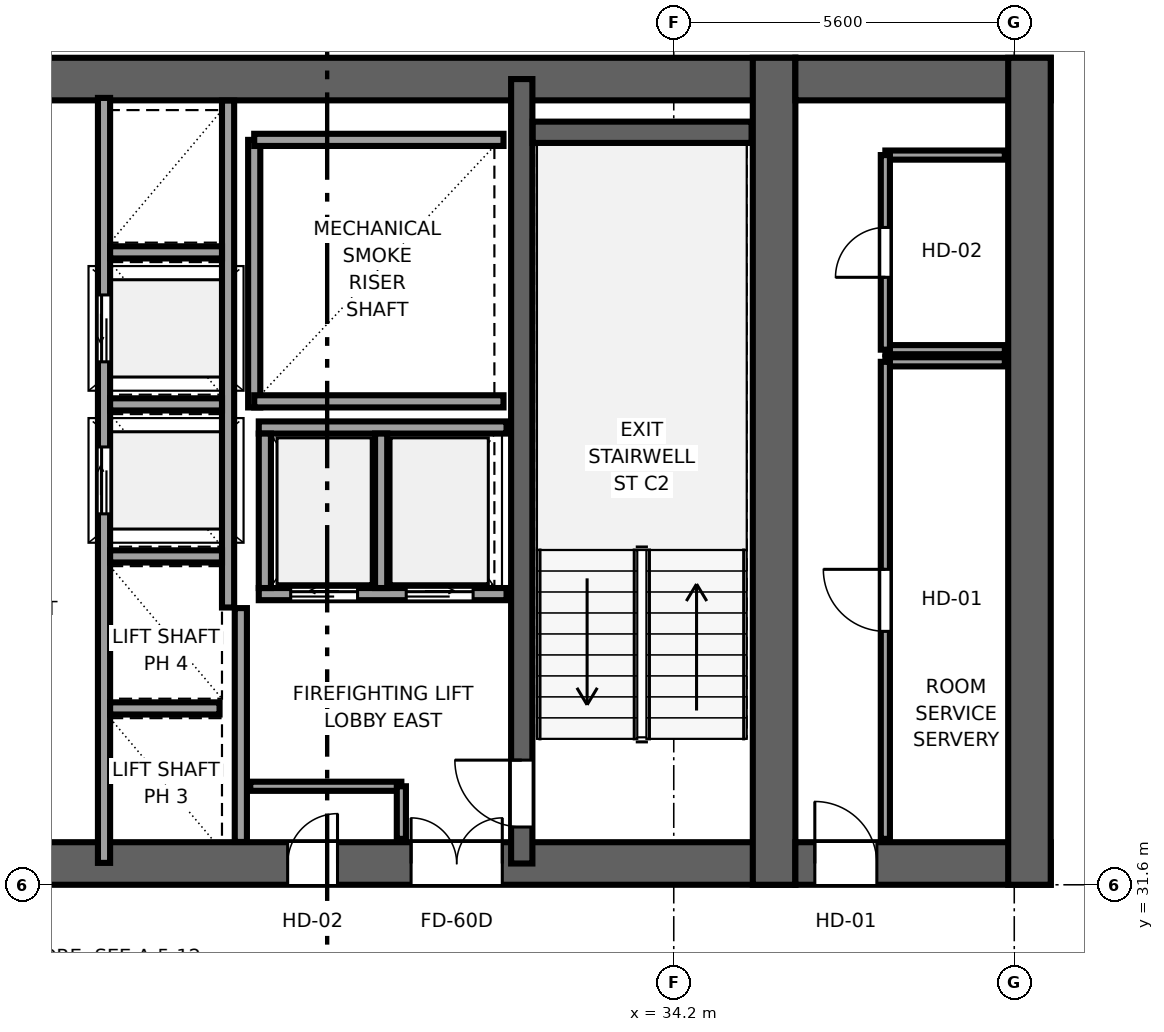
"""IFC4 building model, lengths in metres.
Left out: names, types, materials, properties, quantities, classifications, styles, units other than length and angle.
Written with IfcOpenShell. Run it as: python <this file> out.ifc"""

import sys

from ifc_helpers import new_model, si_unit, direction, frame, frame_2d, origin, place, context, subcontext, project, spatial, rectangle, extrude, source, transform, mapped, element, fill, save


model = new_model("IFC4")
c1 = context("Model", 3, precision=1e-05, world=origin(), true_north=direction((0.0, 1.0)))
c2 = subcontext(c1, "Body", "Model", "MODEL_VIEW")
j1 = project(units=[si_unit("LENGTHUNIT", "METRE"), si_unit("PLANEANGLEUNIT", "RADIAN")], contexts=[c1])
p1 = place(None, origin())
s1 = spatial("IfcSite", under=j1, at=p1, CompositionType="ELEMENT")
p2 = place(p1, origin())
s2 = spatial("IfcBuilding", under=s1, at=p2, CompositionType="ELEMENT")
p3 = place(p2, frame((0.0, 0.0, 179.0)))
s3 = spatial("IfcBuildingStorey", under=s2, at=p3, CompositionType="ELEMENT", Elevation=179.0)
p4 = place(p3, frame((9.8, 31.95, 0.0), z_axis=(0.0, 0.0, 1.0), x_axis=(1.0, 0.0, 0.0)))
e1 = element("IfcWall", 1, at=p4, inside=s3, PredefinedType="SHEAR", context=c2, shape_type="SweptSolid", body=[
    extrude(rectangle(XDim=26.4, YDim=0.7, at=frame_2d((13.2, 0.0))), origin(), (0.0, 0.0, 1.0), 3.55),
])
p5 = place(p4, frame((6.32, 0.0, 0.0), z_axis=(0.0, 0.0, 1.0), x_axis=(-1.0, 0.0, 0.0)))
e2 = element("IfcOpeningElement", 2, at=p5, cuts=e1, PredefinedType="OPENING", context=c2, shape_type="SweptSolid", body=[
    extrude(rectangle(XDim=1.5, YDim=2.04, at=frame_2d((0.75, 1.02))), frame((0.0, 0.36, 0.0), z_axis=(0.0, -1.0, 0.0), x_axis=(1.0, 0.0, 0.0)), (0.0, 0.0, 1.0), 0.72),
])
p6 = place(p4, frame((13.95, 0.0, 0.0), z_axis=(0.0, 0.0, 1.0), x_axis=(-1.0, 0.0, 0.0)))
e3 = element("IfcOpeningElement", 3, at=p6, cuts=e1, PredefinedType="OPENING", context=c2, shape_type="SweptSolid", body=[
    extrude(rectangle(XDim=1.5, YDim=2.04, at=frame_2d((0.75, 1.02))), frame((0.0, 0.36, 0.0), z_axis=(0.0, -1.0, 0.0), x_axis=(1.0, 0.0, 0.0)), (0.0, 0.0, 1.0), 0.72),
])
p7 = place(p4, frame((21.58, 0.0, 0.0), z_axis=(0.0, 0.0, 1.0), x_axis=(-1.0, 0.0, 0.0)))
e4 = element("IfcOpeningElement", 4, at=p7, cuts=e1, PredefinedType="OPENING", context=c2, shape_type="SweptSolid", body=[
    extrude(rectangle(XDim=1.5, YDim=2.04, at=frame_2d((0.75, 1.02))), frame((0.0, 0.36, 0.0), z_axis=(0.0, -1.0, 0.0), x_axis=(1.0, 0.0, 0.0)), (0.0, 0.0, 1.0), 0.72),
])
p8 = place(p4, frame((8.37, 0.0, 0.0), z_axis=(0.0, 0.0, 1.0), x_axis=(-1.0, 0.0, 0.0)))
e5 = element("IfcOpeningElement", 5, at=p8, cuts=e1, PredefinedType="OPENING", context=c2, shape_type="SweptSolid", body=[
    extrude(rectangle(XDim=0.82, YDim=2.01, at=frame_2d((0.41, 1.005))), frame((0.0, 0.36, 0.0), z_axis=(0.0, -1.0, 0.0), x_axis=(1.0, 0.0, 0.0)), (0.0, 0.0, 1.0), 0.72),
])
p9 = place(p4, frame((18.87, 0.0, 0.0), z_axis=(0.0, 0.0, 1.0), x_axis=(-1.0, 0.0, 0.0)))
e6 = element("IfcOpeningElement", 6, at=p9, cuts=e1, PredefinedType="OPENING", context=c2, shape_type="SweptSolid", body=[
    extrude(rectangle(XDim=0.82, YDim=2.01, at=frame_2d((0.41, 1.005))), frame((0.0, 0.36, 0.0), z_axis=(0.0, -1.0, 0.0), x_axis=(1.0, 0.0, 0.0)), (0.0, 0.0, 1.0), 0.72),
])
p10 = place(p3, frame((9.8, 44.85, 0.0), z_axis=(0.0, 0.0, 1.0), x_axis=(1.0, 0.0, 0.0)))
e7 = element("IfcWall", 7, at=p10, inside=s3, PredefinedType="SHEAR", context=c2, shape_type="SweptSolid", body=[
    extrude(rectangle(XDim=26.4, YDim=0.7, at=frame_2d((13.2, 0.0))), origin(), (0.0, 0.0, 1.0), 3.55),
])
p11 = place(p3, frame((35.85, 31.6, 0.0), z_axis=(0.0, 0.0, 1.0), x_axis=(0.0, 1.0, 0.0)))
e8 = element("IfcWall", 8, at=p11, inside=s3, PredefinedType="SHEAR", context=c2, shape_type="SweptSolid", body=[
    extrude(rectangle(XDim=13.6, YDim=0.7, at=frame_2d((6.8, 0.0))), origin(), (0.0, 0.0, 1.0), 3.55),
])
p12 = place(p3, frame((31.7, 31.95, 0.0), z_axis=(0.0, 0.0, 1.0), x_axis=(0.0, 1.0, 0.0)))
e9 = element("IfcWall", 9, at=p12, inside=s3, PredefinedType="SHEAR", context=c2, shape_type="SweptSolid", body=[
    extrude(rectangle(XDim=12.9, YDim=0.35, at=frame_2d((6.45, 0.0))), origin(), (0.0, 0.0, 1.0), 3.55),
])
p13 = place(p12, frame((1.7, 0.0, 0.0), z_axis=(0.0, 0.0, 1.0), x_axis=(-1.0, 0.0, 0.0)))
e10 = element("IfcOpeningElement", 10, at=p13, cuts=e9, PredefinedType="OPENING", context=c2, shape_type="SweptSolid", body=[
    extrude(rectangle(XDim=1.1, YDim=2.12, at=frame_2d((0.55, 1.06))), frame((0.0, 0.185, 0.0), z_axis=(0.0, -1.0, 0.0), x_axis=(1.0, 0.0, 0.0)), (0.0, 0.0, 1.0), 0.37),
])
p14 = place(p3, frame((36.2, 31.95, 0.0), z_axis=(0.0, 0.0, 1.0), x_axis=(1.0, 0.0, 0.0)))
e11 = element("IfcWall", 11, at=p14, inside=s3, PredefinedType="SHEAR", context=c2, shape_type="SweptSolid", body=[
    extrude(rectangle(XDim=4.2, YDim=0.7, at=frame_2d((2.1, 0.0))), origin(), (0.0, 0.0, 1.0), 3.55),
])
p15 = place(p14, frame((1.34, 0.0, 0.0), z_axis=(0.0, 0.0, 1.0), x_axis=(-1.0, 0.0, 0.0)))
e12 = element("IfcOpeningElement", 12, at=p15, cuts=e11, PredefinedType="OPENING", context=c2, shape_type="SweptSolid", body=[
    extrude(rectangle(XDim=1.02, YDim=2.03, at=frame_2d((0.51, 1.015))), frame((0.0, 0.36, 0.0), z_axis=(0.0, -1.0, 0.0), x_axis=(1.0, 0.0, 0.0)), (0.0, 0.0, 1.0), 0.72),
])
p16 = place(p3, frame((36.2, 44.85, 0.0), z_axis=(0.0, 0.0, 1.0), x_axis=(1.0, 0.0, 0.0)))
e13 = element("IfcWall", 13, at=p16, inside=s3, PredefinedType="SHEAR", context=c2, shape_type="SweptSolid", body=[
    extrude(rectangle(XDim=4.2, YDim=0.7, at=frame_2d((2.1, 0.0))), origin(), (0.0, 0.0, 1.0), 3.55),
])
p17 = place(p3, frame((40.05, 31.6, 0.0), z_axis=(0.0, 0.0, 1.0), x_axis=(0.0, 1.0, 0.0)))
e14 = element("IfcWall", 14, at=p17, inside=s3, PredefinedType="SHEAR", context=c2, shape_type="SweptSolid", body=[
    extrude(rectangle(XDim=13.6, YDim=0.7, at=frame_2d((6.8, 0.0))), origin(), (0.0, 0.0, 1.0), 3.55),
])
p18 = place(p3, frame((31.88, 43.975, 0.0), z_axis=(0.0, 0.0, 1.0), x_axis=(1.0, 0.0, 0.0)))
e15 = element("IfcWall", 15, at=p18, inside=s3, PredefinedType="SHEAR", context=c2, shape_type="SweptSolid", body=[
    extrude(rectangle(XDim=3.6, YDim=0.35, at=frame_2d((1.8, 0.0))), origin(), (0.0, 0.0, 1.0), 3.55),
])
p19 = place(p3, frame((27.3, 39.45, 0.0), z_axis=(0.0, 0.0, 1.0), x_axis=(0.0, 1.0, 0.0)))
e16 = element("IfcWall", 16, at=p19, inside=s3, PredefinedType="SOLIDWALL", context=c2, shape_type="SweptSolid", body=[
    extrude(rectangle(XDim=4.4, YDim=0.2, at=frame_2d((2.2, 0.0))), origin(), (0.0, 0.0, 1.0), 3.25),
])
for number, where, z_axis, x_axis in (
    (17, (27.3, 39.55, 0.0), (0.0, 0.0, 1.0), (1.0, 0.0, 0.0)),
    (18, (27.3, 43.85, 0.0), (0.0, 0.0, 1.0), (1.0, 0.0, 0.0)),
):
    element("IfcWall", number, at=place(p3, frame(where, z_axis=z_axis, x_axis=x_axis)), inside=s3, PredefinedType="SOLIDWALL", context=c2, shape_type="SweptSolid", body=[
        extrude(rectangle(XDim=4.1, YDim=0.2, at=frame_2d((2.05, 0.0))), origin(), (0.0, 0.0, 1.0), 3.25),
    ])
p20 = place(p3, frame((27.08, 32.304, 0.0), z_axis=(0.0, 0.0, 1.0), x_axis=(0.0, 1.0, 0.0)))
e19 = element("IfcWall", 19, at=p20, inside=s3, PredefinedType="SOLIDWALL", context=c2, shape_type="SweptSolid", body=[
    extrude(rectangle(XDim=3.846, YDim=0.2, at=frame_2d((1.923, 0.0))), origin(), (0.0, 0.0, 1.0), 3.25),
])
p21 = place(p3, frame((27.375, 36.38, 0.0), z_axis=(0.0, 0.0, 1.0), x_axis=(1.0, 0.0, 0.0)))
e20 = element("IfcWall", 20, at=p21, inside=s3, PredefinedType="SOLIDWALL", context=c2, shape_type="SweptSolid", body=[
    extrude(rectangle(XDim=4.075, YDim=0.2, at=frame_2d((2.038, 0.0))), origin(), (0.0, 0.0, 1.0), 3.25),
])
p22 = place(p21, frame((0.525, 0.0, 0.0)))
e21 = element("IfcOpeningElement", 21, at=p22, cuts=e20, PredefinedType="OPENING", context=c2, shape_type="SweptSolid", body=[
    extrude(rectangle(XDim=1.1, YDim=2.12, at=frame_2d((0.55, 1.06))), frame((0.0, 0.11, 0.0), z_axis=(0.0, -1.0, 0.0), x_axis=(1.0, 0.0, 0.0)), (0.0, 0.0, 1.0), 0.22),
])
p23 = place(p21, frame((2.425, 0.0, 0.0)))
e22 = element("IfcOpeningElement", 22, at=p23, cuts=e20, PredefinedType="OPENING", context=c2, shape_type="SweptSolid", body=[
    extrude(rectangle(XDim=1.1, YDim=2.12, at=frame_2d((0.55, 1.06))), frame((0.0, 0.11, 0.0), z_axis=(0.0, -1.0, 0.0), x_axis=(1.0, 0.0, 0.0)), (0.0, 0.0, 1.0), 0.22),
])
p24 = place(p3, frame((27.375, 39.12, 0.0), z_axis=(0.0, 0.0, 1.0), x_axis=(1.0, 0.0, 0.0)))
e23 = element("IfcWall", 23, at=p24, inside=s3, PredefinedType="SOLIDWALL", context=c2, shape_type="SweptSolid", body=[
    extrude(rectangle(XDim=4.075, YDim=0.2, at=frame_2d((2.038, 0.0))), origin(), (0.0, 0.0, 1.0), 3.25),
])
for number, where, z_axis, x_axis in (
    (24, (27.475, 36.48, 0.0), (0.0, 0.0, 1.0), (0.0, 1.0, 0.0)),
    (25, (29.387, 36.48, 0.0), (0.0, 0.0, 1.0), (0.0, 1.0, 0.0)),
):
    element("IfcWall", number, at=place(p3, frame(where, z_axis=z_axis, x_axis=x_axis)), inside=s3, PredefinedType="SOLIDWALL", context=c2, shape_type="SweptSolid", body=[
        extrude(rectangle(XDim=2.54, YDim=0.2, at=frame_2d((1.27, 0.0))), origin(), (0.0, 0.0, 1.0), 3.25),
    ])
p25 = place(p3, frame((24.83, 31.96, 0.0), z_axis=(0.0, 0.0, 1.0), x_axis=(0.0, 1.0, 0.0)))
e26 = element("IfcWall", 26, at=p25, inside=s3, PredefinedType="SOLIDWALL", context=c2, shape_type="SweptSolid", body=[
    extrude(rectangle(XDim=12.58, YDim=0.2, at=frame_2d((6.29, 0.0))), origin(), (0.0, 0.0, 1.0), 3.25),
])
p26 = place(p25, frame((5.74, 0.0, 0.0)))
e27 = element("IfcOpeningElement", 27, at=p26, cuts=e26, PredefinedType="OPENING", context=c2, shape_type="SweptSolid", body=[
    extrude(rectangle(XDim=1.1, YDim=2.12, at=frame_2d((0.55, 1.06))), frame((0.0, 0.11, 0.0), z_axis=(0.0, -1.0, 0.0), x_axis=(1.0, 0.0, 0.0)), (0.0, 0.0, 1.0), 0.22),
])
p27 = place(p25, frame((8.24, 0.0, 0.0)))
e28 = element("IfcOpeningElement", 28, at=p27, cuts=e26, PredefinedType="OPENING", context=c2, shape_type="SweptSolid", body=[
    extrude(rectangle(XDim=1.1, YDim=2.12, at=frame_2d((0.55, 1.06))), frame((0.0, 0.11, 0.0), z_axis=(0.0, -1.0, 0.0), x_axis=(1.0, 0.0, 0.0)), (0.0, 0.0, 1.0), 0.22),
])
p28 = place(p3, frame((26.87, 36.16, 0.0), z_axis=(0.0, 0.0, 1.0), x_axis=(0.0, 1.0, 0.0)))
e29 = element("IfcWall", 29, at=p28, inside=s3, PredefinedType="SOLIDWALL", context=c2, shape_type="SweptSolid", body=[
    extrude(rectangle(XDim=8.336, YDim=0.2, at=frame_2d((4.168, 0.0))), origin(), (0.0, 0.0, 1.0), 3.25),
])
p29 = place(p3, frame((24.93, 34.5, 0.0), z_axis=(0.0, 0.0, 1.0), x_axis=(1.0, 0.0, 0.0)))
e30 = element("IfcWall", 30, at=p29, inside=s3, PredefinedType="SOLIDWALL", context=c2, shape_type="SweptSolid", body=[
    extrude(rectangle(XDim=1.8, YDim=0.2, at=frame_2d((0.9, 0.0))), origin(), (0.0, 0.0, 1.0), 3.25),
])
for number, where, z_axis, x_axis in (
    (31, (24.93, 37.0, 0.0), (0.0, 0.0, 1.0), (1.0, 0.0, 0.0)),
    (32, (24.93, 39.5, 0.0), (0.0, 0.0, 1.0), (1.0, 0.0, 0.0)),
    (33, (24.93, 42.0, 0.0), (0.0, 0.0, 1.0), (1.0, 0.0, 0.0)),
):
    element("IfcWall", number, at=place(p3, frame(where, z_axis=z_axis, x_axis=x_axis)), inside=s3, PredefinedType="SOLIDWALL", context=c2, shape_type="SweptSolid", body=[
        extrude(rectangle(XDim=1.84, YDim=0.2, at=frame_2d((0.92, 0.0))), origin(), (0.0, 0.0, 1.0), 3.25),
    ])
p30 = place(p3, frame((27.235, 33.22, 0.0), z_axis=(0.0, 0.0, 1.0), x_axis=(1.0, 0.0, 0.0)))
e34 = element("IfcWall", 34, at=p30, inside=s3, PredefinedType="PARTITIONING", context=c2, shape_type="SweptSolid", body=[
    extrude(rectangle(XDim=2.485, YDim=0.15, at=frame_2d((1.242, 0.0))), origin(), (0.0, 0.0, 1.0), 3.25),
])
p31 = place(p3, frame((29.72, 32.355, 0.0), z_axis=(0.0, 0.0, 1.0), x_axis=(0.0, 1.0, 0.0)))
e35 = element("IfcWall", 35, at=p31, inside=s3, PredefinedType="PARTITIONING", context=c2, shape_type="SweptSolid", body=[
    extrude(rectangle(XDim=0.865, YDim=0.15, at=frame_2d((0.433, 0.0))), origin(), (0.0, 0.0, 1.0), 3.25),
])
p32 = place(p3, frame((37.68, 40.2, 0.0), z_axis=(0.0, 0.0, 1.0), x_axis=(1.0, 0.0, 0.0)))
e36 = element("IfcWall", 36, at=p32, inside=s3, PredefinedType="PARTITIONING", context=c2, shape_type="SweptSolid", body=[
    extrude(rectangle(XDim=1.965, YDim=0.15, at=frame_2d((0.982, 0.0))), origin(), (0.0, 0.0, 1.0), 3.25),
])
p33 = place(p3, frame((37.68, 32.355, 0.0), z_axis=(0.0, 0.0, 1.0), x_axis=(0.0, 1.0, 0.0)))
e37 = element("IfcWall", 37, at=p33, inside=s3, PredefinedType="PARTITIONING", context=c2, shape_type="SweptSolid", body=[
    extrude(rectangle(XDim=7.845, YDim=0.15, at=frame_2d((3.922, 0.0))), origin(), (0.0, 0.0, 1.0), 3.25),
])
p34 = place(p33, frame((3.413, 0.0, 0.0)))
e38 = element("IfcOpeningElement", 38, at=p34, cuts=e37, PredefinedType="OPENING", context=c2, shape_type="SweptSolid", body=[
    extrude(rectangle(XDim=1.02, YDim=2.03, at=frame_2d((0.51, 1.015))), frame((0.0, 0.085, 0.0), z_axis=(0.0, -1.0, 0.0), x_axis=(1.0, 0.0, 0.0)), (0.0, 0.0, 1.0), 0.17),
])
for number, where, z_axis, x_axis in (
    (39, (37.68, 40.4, 0.0), (0.0, 0.0, 1.0), (1.0, 0.0, 0.0)),
    (40, (37.68, 43.6, 0.0), (0.0, 0.0, 1.0), (1.0, 0.0, 0.0)),
):
    element("IfcWall", number, at=place(p3, frame(where, z_axis=z_axis, x_axis=x_axis)), inside=s3, PredefinedType="PARTITIONING", context=c2, shape_type="SweptSolid", body=[
        extrude(rectangle(XDim=1.965, YDim=0.15, at=frame_2d((0.982, 0.0))), origin(), (0.0, 0.0, 1.0), 3.25),
    ])
p35 = place(p3, frame((37.68, 40.4, 0.0), z_axis=(0.0, 0.0, 1.0), x_axis=(0.0, 1.0, 0.0)))
e41 = element("IfcWall", 41, at=p35, inside=s3, PredefinedType="PARTITIONING", context=c2, shape_type="SweptSolid", body=[
    extrude(rectangle(XDim=3.2, YDim=0.15, at=frame_2d((1.6, 0.0))), origin(), (0.0, 0.0, 1.0), 3.25),
])
p36 = place(p35, frame((1.19, 0.0, 0.0)))
e42 = element("IfcOpeningElement", 42, at=p36, cuts=e41, PredefinedType="OPENING", context=c2, shape_type="SweptSolid", body=[
    extrude(rectangle(XDim=0.82, YDim=2.01, at=frame_2d((0.41, 1.005))), frame((0.0, 0.085, 0.0), z_axis=(0.0, -1.0, 0.0), x_axis=(1.0, 0.0, 0.0)), (0.0, 0.0, 1.0), 0.17),
])
m1 = source(origin(), c2, "Body", "SweptSolid", [
    extrude(rectangle(XDim=1.1, YDim=2.12, at=frame_2d((0.55, 1.06))), frame((0.0, 0.025, 0.0), z_axis=(0.0, -1.0, 0.0), x_axis=(1.0, 0.0, 0.0)), (0.0, 0.0, 1.0), 0.05),
])
p37 = place(p13, origin())
e43 = element("IfcDoor", 43, at=p37, inside=s3, OperationType="SINGLE_SWING_RIGHT", PredefinedType="DOOR", context=c2, shape_type="MappedRepresentation", body=[
    mapped(m1, transform((0.0, 0.0, 0.0), x_axis=(1.0, 0.0, 0.0), y_axis=(0.0, 1.0, 0.0), z_axis=(0.0, 0.0, 1.0), scale=1.0)),
])
fill(e10, e43)
m2 = source(origin(), c2, "Body", "SweptSolid", [
    extrude(rectangle(XDim=1.5, YDim=2.04, at=frame_2d((0.75, 1.02))), frame((0.0, 0.025, 0.0), z_axis=(0.0, -1.0, 0.0), x_axis=(1.0, 0.0, 0.0)), (0.0, 0.0, 1.0), 0.05),
])
p38 = place(p7, origin())
e44 = element("IfcDoor", 44, at=p38, inside=s3, OperationType="DOUBLE_DOOR_SINGLE_SWING", PredefinedType="DOOR", context=c2, shape_type="MappedRepresentation", body=[
    mapped(m2, transform((0.0, 0.0, 0.0), x_axis=(1.0, 0.0, 0.0), y_axis=(0.0, 1.0, 0.0), z_axis=(0.0, 0.0, 1.0), scale=1.0)),
])
fill(e4, e44)
m3 = source(origin(), c2, "Body", "SweptSolid", [
    extrude(rectangle(XDim=0.82, YDim=2.01, at=frame_2d((0.41, 1.005))), frame((0.0, 0.025, 0.0), z_axis=(0.0, -1.0, 0.0), x_axis=(1.0, 0.0, 0.0)), (0.0, 0.0, 1.0), 0.05),
])
p39 = place(p9, origin())
e45 = element("IfcDoor", 45, at=p39, inside=s3, OperationType="SINGLE_SWING_RIGHT", PredefinedType="DOOR", context=c2, shape_type="MappedRepresentation", body=[
    mapped(m3, transform((0.0, 0.0, 0.0), x_axis=(1.0, 0.0, 0.0), y_axis=(0.0, 1.0, 0.0), z_axis=(0.0, 0.0, 1.0), scale=1.0)),
])
fill(e6, e45)
m4 = source(origin(), c2, "Body", "SweptSolid", [
    extrude(rectangle(XDim=1.02, YDim=2.03, at=frame_2d((0.51, 1.015))), frame((0.0, 0.025, 0.0), z_axis=(0.0, -1.0, 0.0), x_axis=(1.0, 0.0, 0.0)), (0.0, 0.0, 1.0), 0.05),
])
p40 = place(p15, origin())
e46 = element("IfcDoor", 46, at=p40, inside=s3, OperationType="SINGLE_SWING_LEFT", PredefinedType="DOOR", context=c2, shape_type="MappedRepresentation", body=[
    mapped(m4, transform((0.0, 0.0, 0.0), x_axis=(1.0, 0.0, 0.0), y_axis=(0.0, 1.0, 0.0), z_axis=(0.0, 0.0, 1.0), scale=1.0)),
])
fill(e12, e46)
m5 = source(origin(), c2, "Body", "SweptSolid", [
    extrude(rectangle(XDim=1.1, YDim=2.12, at=frame_2d((0.55, 1.06))), frame((0.0, 0.025, 0.0), z_axis=(0.0, -1.0, 0.0), x_axis=(1.0, 0.0, 0.0)), (0.0, 0.0, 1.0), 0.05),
])
p41 = place(p22, origin())
e47 = element("IfcDoor", 47, at=p41, inside=s3, OperationType="SLIDING_TO_LEFT", PredefinedType="DOOR", context=c2, shape_type="MappedRepresentation", body=[
    mapped(m5, transform((0.0, 0.0, 0.0), x_axis=(1.0, 0.0, 0.0), y_axis=(0.0, 1.0, 0.0), z_axis=(0.0, 0.0, 1.0), scale=1.0)),
])
fill(e21, e47)
p42 = place(p23, origin())
e48 = element("IfcDoor", 48, at=p42, inside=s3, OperationType="SLIDING_TO_RIGHT", PredefinedType="DOOR", context=c2, shape_type="MappedRepresentation", body=[
    mapped(m5, transform((0.0, 0.0, 0.0), x_axis=(1.0, 0.0, 0.0), y_axis=(0.0, 1.0, 0.0), z_axis=(0.0, 0.0, 1.0), scale=1.0)),
])
fill(e22, e48)
p43 = place(p26, origin())
e49 = element("IfcDoor", 49, at=p43, inside=s3, OperationType="SLIDING_TO_RIGHT", PredefinedType="DOOR", context=c2, shape_type="MappedRepresentation", body=[
    mapped(m5, transform((0.0, 0.0, 0.0), x_axis=(1.0, 0.0, 0.0), y_axis=(0.0, 1.0, 0.0), z_axis=(0.0, 0.0, 1.0), scale=1.0)),
])
fill(e27, e49)
p44 = place(p27, origin())
e50 = element("IfcDoor", 50, at=p44, inside=s3, OperationType="SLIDING_TO_LEFT", PredefinedType="DOOR", context=c2, shape_type="MappedRepresentation", body=[
    mapped(m5, transform((0.0, 0.0, 0.0), x_axis=(1.0, 0.0, 0.0), y_axis=(0.0, 1.0, 0.0), z_axis=(0.0, 0.0, 1.0), scale=1.0)),
])
fill(e28, e50)
p45 = place(p34, origin())
e51 = element("IfcDoor", 51, at=p45, inside=s3, OperationType="SINGLE_SWING_RIGHT", PredefinedType="DOOR", context=c2, shape_type="MappedRepresentation", body=[
    mapped(m4, transform((0.0, 0.0, 0.0), x_axis=(1.0, 0.0, 0.0), y_axis=(0.0, 1.0, 0.0), z_axis=(0.0, 0.0, 1.0), scale=1.0)),
])
fill(e38, e51)
p46 = place(p36, origin())
e52 = element("IfcDoor", 52, at=p46, inside=s3, OperationType="SINGLE_SWING_LEFT", PredefinedType="DOOR", context=c2, shape_type="MappedRepresentation", body=[
    mapped(m3, transform((0.0, 0.0, 0.0), x_axis=(1.0, 0.0, 0.0), y_axis=(0.0, 1.0, 0.0), z_axis=(0.0, 0.0, 1.0), scale=1.0)),
])
fill(e42, e52)
save(model, sys.argv[1])
